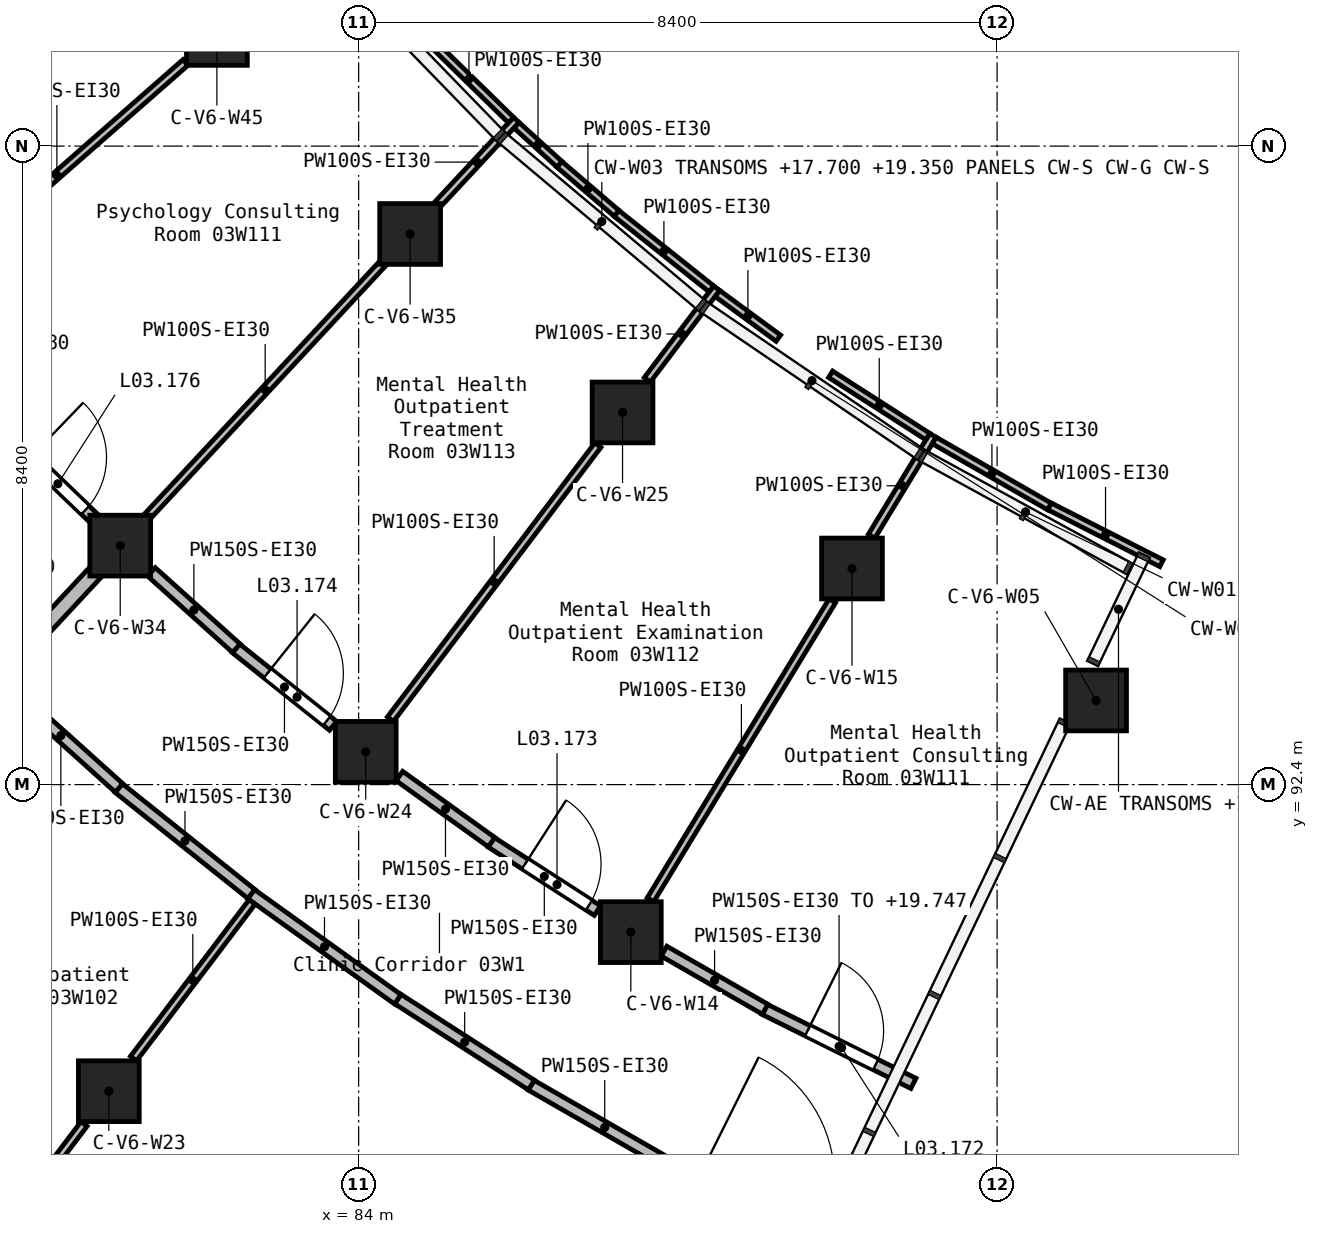
"""IFC4 building model, lengths in metres.
Left out: names, types, materials, properties, quantities, classifications, styles, units other than length and angle.
Written with IfcOpenShell. Run it as: python <this file> out.ifc"""

import sys

from ifc_helpers import new_model, si_unit, direction, frame, frame_2d, origin, origin_2d, place, context, subcontext, project, spatial, rectangle, extrude, element, fill, save


model = new_model("IFC4")
c1 = context("Model", 3, precision=1e-05, world=origin(), true_north=direction((0.0, 1.0)))
c2 = subcontext(c1, "Body", "Model", "MODEL_VIEW")
j1 = project(units=[si_unit("LENGTHUNIT", "METRE"), si_unit("PLANEANGLEUNIT", "RADIAN")], contexts=[c1])
p1 = place(None, origin())
s1 = spatial("IfcSite", under=j1, at=p1, CompositionType="ELEMENT")
p2 = place(p1, origin())
s2 = spatial("IfcBuilding", under=s1, at=p2, CompositionType="ELEMENT")
p3 = place(p2, frame((0.0, 0.0, 16.8)))
s3 = spatial("IfcBuildingStorey", under=s2, at=p3, CompositionType="ELEMENT", Elevation=16.8)
for number, where, z_axis, x_axis in (
    (1, (80.713, 88.366, 0.0), (0.0, 0.0, 1.0), (1.0, 0.0, 0.0)),
    (2, (80.863, 95.544, 0.0), (0.0, 0.0, 1.0), (1.0, 0.0, 0.0)),
    (3, (82.135, 102.263, 0.0), (0.0, 0.0, 1.0), (1.0, 0.0, 0.0)),
    (4, (84.093, 92.831, 0.0), (0.0, 0.0, 1.0), (1.0, 0.0, 0.0)),
    (5, (84.677, 99.644, 0.0), (0.0, 0.0, 1.0), (1.0, 0.0, 0.0)),
    (6, (87.472, 97.296, 0.0), (0.0, 0.0, 1.0), (1.0, 0.0, 0.0)),
    (7, (87.581, 90.459, 0.0), (0.0, 0.0, 1.0), (1.0, 0.0, 0.0)),
    (8, (90.491, 95.243, 0.0), (0.0, 0.0, 1.0), (1.0, 0.0, 0.0)),
    (9, (93.702, 93.507, 0.0), (0.0, 0.0, 1.0), (1.0, 0.0, 0.0)),
):
    element("IfcColumn", number, at=place(p3, frame(where, z_axis=z_axis, x_axis=x_axis)), inside=s3, PredefinedType="COLUMN", context=c2, shape_type="SweptSolid", body=[
        extrude(rectangle(XDim=0.8, YDim=0.8, at=origin_2d()), origin(), (0.0, 0.0, 1.0), 4.2),
    ])
p4 = place(p3, frame((79.19, 93.746, 0.0), z_axis=(0.0, 0.0, 1.0), x_axis=(0.681171780306, 0.732123627344, 0.0)))
e10 = element("IfcWall", 10, at=p4, inside=s3, PredefinedType="SOLIDWALL", context=c2, shape_type="SweptSolid", body=[
    extrude(rectangle(XDim=1.974, YDim=0.2, at=frame_2d((0.987, 0.0))), origin(), (0.0, 0.0, 1.0), 3.9),
])
p5 = place(p3, frame((82.583, 90.961, 0.0), z_axis=(0.0, 0.0, 1.0), x_axis=(0.812456963848, -0.583021167622, 0.0)))
e11 = element("IfcWall", 11, at=p5, inside=s3, PredefinedType="PARTITIONING", context=c2, shape_type="SweptSolid", body=[
    extrude(rectangle(XDim=2.381, YDim=0.15, at=frame_2d((1.191, 0.0))), origin(), (0.0, 0.0, 1.0), 3.9),
])
p6 = place(p3, frame((80.841, 92.356, 0.0), z_axis=(0.0, 0.0, 1.0), x_axis=(0.781561025488, -0.62382879337, 0.0)))
e12 = element("IfcWall", 12, at=p6, inside=s3, PredefinedType="PARTITIONING", context=c2, shape_type="SweptSolid", body=[
    extrude(rectangle(XDim=2.235, YDim=0.15, at=frame_2d((1.118, 0.0))), origin(), (0.0, 0.0, 1.0), 3.9),
])
p7 = place(p3, frame((86.268, 88.446, 0.0), z_axis=(0.0, 0.0, 1.0), x_axis=(0.867212921502, -0.497937494852, 0.0)))
e13 = element("IfcWall", 13, at=p7, inside=s3, PredefinedType="PARTITIONING", context=c2, shape_type="SweptSolid", body=[
    extrude(rectangle(XDim=2.235, YDim=0.15, at=frame_2d((1.118, 0.0))), origin(), (0.0, 0.0, 1.0), 3.9),
])
p8 = place(p3, frame((79.316, 93.733, 0.0), z_axis=(0.0, 0.0, 1.0), x_axis=(0.74346507851, -0.668774758073, 0.0)))
e14 = element("IfcWall", 14, at=p8, inside=s3, PredefinedType="PARTITIONING", context=c2, shape_type="SweptSolid", body=[
    extrude(rectangle(XDim=2.059, YDim=0.15, at=frame_2d((1.03, 0.0))), origin(), (0.0, 0.0, 1.0), 3.9),
])
p9 = place(p3, frame((84.517, 89.577, 0.0), z_axis=(0.0, 0.0, 1.0), x_axis=(0.840935250807, -0.541135753717, 0.0)))
e15 = element("IfcWall", 15, at=p9, inside=s3, PredefinedType="PARTITIONING", context=c2, shape_type="SweptSolid", body=[
    extrude(rectangle(XDim=2.088, YDim=0.15, at=frame_2d((1.044, 0.0))), origin(), (0.0, 0.0, 1.0), 3.9),
])
p10 = place(p3, frame((82.385, 94.194, 0.0), z_axis=(0.0, 0.0, 1.0), x_axis=(0.781756052881, -0.623584375833, 0.0)))
e16 = element("IfcWall", 16, at=p10, inside=s3, PredefinedType="PARTITIONING", context=c2, shape_type="SweptSolid", body=[
    extrude(rectangle(XDim=1.636, YDim=0.15, at=frame_2d((0.818, 0.0))), origin(), (0.0, 0.0, 1.0), 3.9),
])
p11 = place(p10, frame((0.53, 0.0, 0.0)))
e17 = element("IfcOpeningElement", 17, at=p11, cuts=e16, PredefinedType="OPENING", context=c2, shape_type="SweptSolid", body=[
    extrude(rectangle(XDim=1.0, YDim=2.1, at=frame_2d((0.5, 1.05))), frame((0.0, 0.085, 0.0), z_axis=(0.0, -1.0, 0.0), x_axis=(1.0, 0.0, 0.0)), (0.0, 0.0, 1.0), 0.17),
])
p12 = place(p3, frame((89.343, 89.442, 0.0), z_axis=(0.0, 0.0, 1.0), x_axis=(0.895274815557, -0.445514314731, 0.0)))
e18 = element("IfcWall", 18, at=p12, inside=s3, PredefinedType="PARTITIONING", context=c2, shape_type="SweptSolid", body=[
    extrude(rectangle(XDim=2.185, YDim=0.15, at=frame_2d((1.092, 0.0))), origin(), (0.0, 0.0, 1.0), 2.947),
])
p13 = place(p12, frame((0.63, 0.0, 0.0)))
e19 = element("IfcOpeningElement", 19, at=p13, cuts=e18, PredefinedType="OPENING", context=c2, shape_type="SweptSolid", body=[
    extrude(rectangle(XDim=1.0, YDim=2.1, at=frame_2d((0.5, 1.05))), frame((0.0, 0.085, 0.0), z_axis=(0.0, -1.0, 0.0), x_axis=(1.0, 0.0, 0.0)), (0.0, 0.0, 1.0), 0.17),
])
p14 = place(p3, frame((85.744, 91.642, 0.0), z_axis=(0.0, 0.0, 1.0), x_axis=(0.840848932624, -0.54126987031, 0.0)))
e20 = element("IfcWall", 20, at=p14, inside=s3, PredefinedType="PARTITIONING", context=c2, shape_type="SweptSolid", body=[
    extrude(rectangle(XDim=1.662, YDim=0.15, at=frame_2d((0.831, 0.0))), origin(), (0.0, 0.0, 1.0), 3.9),
])
p15 = place(p14, frame((0.53, 0.0, 0.0)))
e21 = element("IfcOpeningElement", 21, at=p15, cuts=e20, PredefinedType="OPENING", context=c2, shape_type="SweptSolid", body=[
    extrude(rectangle(XDim=1.0, YDim=2.1, at=frame_2d((0.5, 1.05))), frame((0.0, 0.085, 0.0), z_axis=(0.0, -1.0, 0.0), x_axis=(1.0, 0.0, 0.0)), (0.0, 0.0, 1.0), 0.17),
])
p16 = place(p3, frame((79.301, 97.072, 0.0), z_axis=(0.0, 0.0, 1.0), x_axis=(0.720465115712, -0.69349118022, 0.0)))
e22 = element("IfcWall", 22, at=p16, inside=s3, PredefinedType="PARTITIONING", context=c2, shape_type="SweptSolid", body=[
    extrude(rectangle(XDim=1.684, YDim=0.15, at=frame_2d((0.842, 0.0))), origin(), (0.0, 0.0, 1.0), 3.9),
])
p17 = place(p16, frame((0.53, 0.0, 0.0)))
e23 = element("IfcOpeningElement", 23, at=p17, cuts=e22, PredefinedType="OPENING", context=c2, shape_type="SweptSolid", body=[
    extrude(rectangle(XDim=1.0, YDim=2.1, at=frame_2d((0.5, 1.05))), frame((0.0, 0.085, 0.0), z_axis=(0.0, -1.0, 0.0), x_axis=(1.0, 0.0, 0.0)), (0.0, 0.0, 1.0), 0.17),
])
p18 = place(p3, frame((84.536, 92.513, 0.0), z_axis=(0.0, 0.0, 1.0), x_axis=(0.81243891359, -0.583046320359, 0.0)))
e24 = element("IfcWall", 24, at=p18, inside=s3, PredefinedType="PARTITIONING", context=c2, shape_type="SweptSolid", body=[
    extrude(rectangle(XDim=1.493, YDim=0.15, at=frame_2d((0.747, 0.0))), origin(), (0.0, 0.0, 1.0), 3.9),
])
p19 = place(p3, frame((88.018, 90.208, 0.0), z_axis=(0.0, 0.0, 1.0), x_axis=(0.867174234795, -0.498004865947, 0.0)))
e25 = element("IfcWall", 25, at=p19, inside=s3, PredefinedType="PARTITIONING", context=c2, shape_type="SweptSolid", body=[
    extrude(rectangle(XDim=1.535, YDim=0.15, at=frame_2d((0.768, 0.0))), origin(), (0.0, 0.0, 1.0), 3.9),
])
p20 = place(p3, frame((81.273, 95.199, 0.0), z_axis=(0.0, 0.0, 1.0), x_axis=(0.743576936712, -0.668650386368, 0.0)))
e26 = element("IfcWall", 26, at=p20, inside=s3, PredefinedType="PARTITIONING", context=c2, shape_type="SweptSolid", body=[
    extrude(rectangle(XDim=1.502, YDim=0.15, at=frame_2d((0.751, 0.0))), origin(), (0.0, 0.0, 1.0), 3.9),
])
p21 = place(p3, frame((84.418, 93.26, 0.0), z_axis=(0.0, 0.0, 1.0), x_axis=(0.603501117064, 0.797362152163, 0.0)))
e27 = element("IfcWall", 27, at=p21, inside=s3, PredefinedType="PARTITIONING", context=c2, shape_type="SweptSolid", body=[
    extrude(rectangle(XDim=4.522, YDim=0.1, at=frame_2d((2.261, 0.0))), origin(), (0.0, 0.0, 1.0), 3.9),
])
p22 = place(p3, frame((87.798, 97.726, 0.0), z_axis=(0.0, 0.0, 1.0), x_axis=(0.603534256712, 0.797337068607, 0.0)))
e28 = element("IfcWall", 28, at=p22, inside=s3, PredefinedType="PARTITIONING", context=c2, shape_type="SweptSolid", body=[
    extrude(rectangle(XDim=1.512, YDim=0.1, at=frame_2d((0.756, 0.0))), origin(), (0.0, 0.0, 1.0), 3.9),
])
p23 = place(p3, frame((78.338, 98.933, 0.0), z_axis=(0.0, 0.0, 1.0), x_axis=(0.751823288541, 0.659364650863, 0.0)))
e29 = element("IfcWall", 29, at=p23, inside=s3, PredefinedType="PARTITIONING", context=c2, shape_type="SweptSolid", body=[
    extrude(rectangle(XDim=4.5, YDim=0.1, at=frame_2d((2.25, 0.0))), origin(), (0.0, 0.0, 1.0), 3.9),
])
p24 = place(p3, frame((87.84, 90.885, 0.0), z_axis=(0.0, 0.0, 1.0), x_axis=(0.519618801015, 0.854398210223, 0.0)))
e30 = element("IfcWall", 30, at=p24, inside=s3, PredefinedType="PARTITIONING", context=c2, shape_type="SweptSolid", body=[
    extrude(rectangle(XDim=4.603, YDim=0.1, at=frame_2d((2.302, 0.0))), origin(), (0.0, 0.0, 1.0), 3.9),
])
p25 = place(p3, frame((90.75, 95.668, 0.0), z_axis=(0.0, 0.0, 1.0), x_axis=(0.519552672181, 0.854438424247, 0.0)))
e31 = element("IfcWall", 31, at=p25, inside=s3, PredefinedType="PARTITIONING", context=c2, shape_type="SweptSolid", body=[
    extrude(rectangle(XDim=1.552, YDim=0.1, at=frame_2d((0.776, 0.0))), origin(), (0.0, 0.0, 1.0), 3.9),
])
p26 = place(p3, frame((81.227, 95.935, 0.0), z_axis=(0.0, 0.0, 1.0), x_axis=(0.681211440492, 0.732086725288, 0.0)))
e32 = element("IfcWall", 32, at=p26, inside=s3, PredefinedType="PARTITIONING", context=c2, shape_type="SweptSolid", body=[
    extrude(rectangle(XDim=4.53, YDim=0.1, at=frame_2d((2.265, 0.0))), origin(), (0.0, 0.0, 1.0), 3.9),
])
p27 = place(p3, frame((85.041, 100.034, 0.0), z_axis=(0.0, 0.0, 1.0), x_axis=(0.681296599079, 0.732007475428, 0.0)))
e33 = element("IfcWall", 33, at=p27, inside=s3, PredefinedType="PARTITIONING", context=c2, shape_type="SweptSolid", body=[
    extrude(rectangle(XDim=1.517, YDim=0.1, at=frame_2d((0.758, 0.0))), origin(), (0.0, 0.0, 1.0), 3.9),
])
p28 = place(p3, frame((79.312, 86.515, 0.0), z_axis=(0.0, 0.0, 1.0), x_axis=(0.603588624137, 0.797295912954, 0.0)))
e34 = element("IfcWall", 34, at=p28, inside=s3, PredefinedType="PARTITIONING", context=c2, shape_type="SweptSolid", body=[
    extrude(rectangle(XDim=1.782, YDim=0.1, at=frame_2d((0.891, 0.0))), origin(), (0.0, 0.0, 1.0), 3.9),
])
p29 = place(p3, frame((81.038, 88.796, 0.0), z_axis=(0.0, 0.0, 1.0), x_axis=(0.603561177332, 0.797316690668, 0.0)))
e35 = element("IfcWall", 35, at=p29, inside=s3, PredefinedType="PARTITIONING", context=c2, shape_type="SweptSolid", body=[
    extrude(rectangle(XDim=2.584, YDim=0.1, at=frame_2d((1.292, 0.0))), origin(), (0.0, 0.0, 1.0), 3.9),
])
p30 = place(p3, frame((91.572, 96.928, 0.0), z_axis=(0.0, 0.0, 1.0), x_axis=(0.867607434085, -0.497249776591, 0.0)))
e36 = element("IfcWall", 36, at=p30, inside=s3, PredefinedType="PARTITIONING", context=c2, shape_type="SweptSolid", body=[
    extrude(rectangle(XDim=1.751, YDim=0.1, at=frame_2d((0.875, 0.0))), origin(), (0.0, 0.0, 1.0), 3.9),
])
p31 = place(p3, frame((93.09, 96.06, 0.0), z_axis=(0.0, 0.0, 1.0), x_axis=(0.891511605142, -0.452997856393, 0.0)))
e37 = element("IfcWall", 37, at=p31, inside=s3, PredefinedType="PARTITIONING", context=c2, shape_type="SweptSolid", body=[
    extrude(rectangle(XDim=1.652, YDim=0.1, at=frame_2d((0.826, 0.0))), origin(), (0.0, 0.0, 1.0), 3.9),
])
p32 = place(p3, frame((87.391, 99.916, 0.0), z_axis=(0.0, 0.0, 1.0), x_axis=(0.7827431138, -0.622344934742, 0.0)))
e38 = element("IfcWall", 38, at=p32, inside=s3, PredefinedType="PARTITIONING", context=c2, shape_type="SweptSolid", body=[
    extrude(rectangle(XDim=1.598, YDim=0.1, at=frame_2d((0.799, 0.0))), origin(), (0.0, 0.0, 1.0), 3.9),
])
p33 = place(p3, frame((90.21, 97.798, 0.0), z_axis=(0.0, 0.0, 1.0), x_axis=(0.841976481819, -0.539514229713, 0.0)))
e39 = element("IfcWall", 39, at=p33, inside=s3, PredefinedType="PARTITIONING", context=c2, shape_type="SweptSolid", body=[
    extrude(rectangle(XDim=1.519, YDim=0.1, at=frame_2d((0.76, 0.0))), origin(), (0.0, 0.0, 1.0), 3.9),
])
p34 = place(p3, frame((84.897, 102.224, 0.0), z_axis=(0.0, 0.0, 1.0), x_axis=(0.715491637519, -0.698621297013, 0.0)))
e40 = element("IfcWall", 40, at=p34, inside=s3, PredefinedType="PARTITIONING", context=c2, shape_type="SweptSolid", body=[
    extrude(rectangle(XDim=1.548, YDim=0.1, at=frame_2d((0.774, 0.0))), origin(), (0.0, 0.0, 1.0), 3.9),
])
p35 = place(p3, frame((88.721, 98.861, 0.0), z_axis=(0.0, 0.0, 1.0), x_axis=(0.806061198055, -0.591832193269, 0.0)))
e41 = element("IfcWall", 41, at=p35, inside=s3, PredefinedType="PARTITIONING", context=c2, shape_type="SweptSolid", body=[
    extrude(rectangle(XDim=0.994, YDim=0.1, at=frame_2d((0.497, 0.0))), origin(), (0.0, 0.0, 1.0), 3.9),
])
p36 = place(p3, frame((86.64, 100.562, 0.0), z_axis=(0.0, 0.0, 1.0), x_axis=(0.759638737838, -0.650345283658, 0.0)))
e42 = element("IfcWall", 42, at=p36, inside=s3, PredefinedType="PARTITIONING", context=c2, shape_type="SweptSolid", body=[
    extrude(rectangle(XDim=0.992, YDim=0.1, at=frame_2d((0.496, 0.0))), origin(), (0.0, 0.0, 1.0), 3.9),
])
p37 = place(p3, frame((86.077, 101.074, 0.0), z_axis=(0.0, 0.0, 1.0), x_axis=(0.740693092669, -0.671843540173, 0.0)))
e43 = element("IfcWall", 43, at=p37, inside=s3, PredefinedType="PARTITIONING", context=c2, shape_type="SweptSolid", body=[
    extrude(rectangle(XDim=0.762, YDim=0.1, at=frame_2d((0.381, 0.0))), origin(), (0.0, 0.0, 1.0), 3.9),
])
p38 = place(p13, origin())
e44 = element("IfcDoor", 44, at=p38, inside=s3, OperationType="SINGLE_SWING_RIGHT", PredefinedType="DOOR", context=c2, shape_type="SweptSolid", body=[
    extrude(rectangle(XDim=1.0, YDim=2.1, at=frame_2d((0.5, 1.05))), frame((0.0, 0.025, 0.0), z_axis=(0.0, -1.0, 0.0), x_axis=(1.0, 0.0, 0.0)), (0.0, 0.0, 1.0), 0.05),
])
fill(e19, e44)
p39 = place(p15, origin())
e45 = element("IfcDoor", 45, at=p39, inside=s3, OperationType="SINGLE_SWING_RIGHT", PredefinedType="DOOR", context=c2, shape_type="SweptSolid", body=[
    extrude(rectangle(XDim=1.0, YDim=2.1, at=frame_2d((0.5, 1.05))), frame((0.0, 0.025, 0.0), z_axis=(0.0, -1.0, 0.0), x_axis=(1.0, 0.0, 0.0)), (0.0, 0.0, 1.0), 0.05),
])
fill(e21, e45)
p40 = place(p11, origin())
e46 = element("IfcDoor", 46, at=p40, inside=s3, OperationType="SINGLE_SWING_RIGHT", PredefinedType="DOOR", context=c2, shape_type="SweptSolid", body=[
    extrude(rectangle(XDim=1.0, YDim=2.1, at=frame_2d((0.5, 1.05))), frame((0.0, 0.025, 0.0), z_axis=(0.0, -1.0, 0.0), x_axis=(1.0, 0.0, 0.0)), (0.0, 0.0, 1.0), 0.05),
])
fill(e17, e46)
p41 = place(p17, origin())
e47 = element("IfcDoor", 47, at=p41, inside=s3, OperationType="SINGLE_SWING_RIGHT", PredefinedType="DOOR", context=c2, shape_type="SweptSolid", body=[
    extrude(rectangle(XDim=1.0, YDim=2.1, at=frame_2d((0.5, 1.05))), frame((0.0, 0.025, 0.0), z_axis=(0.0, -1.0, 0.0), x_axis=(1.0, 0.0, 0.0)), (0.0, 0.0, 1.0), 0.05),
])
fill(e23, e47)
save(model, sys.argv[1])
